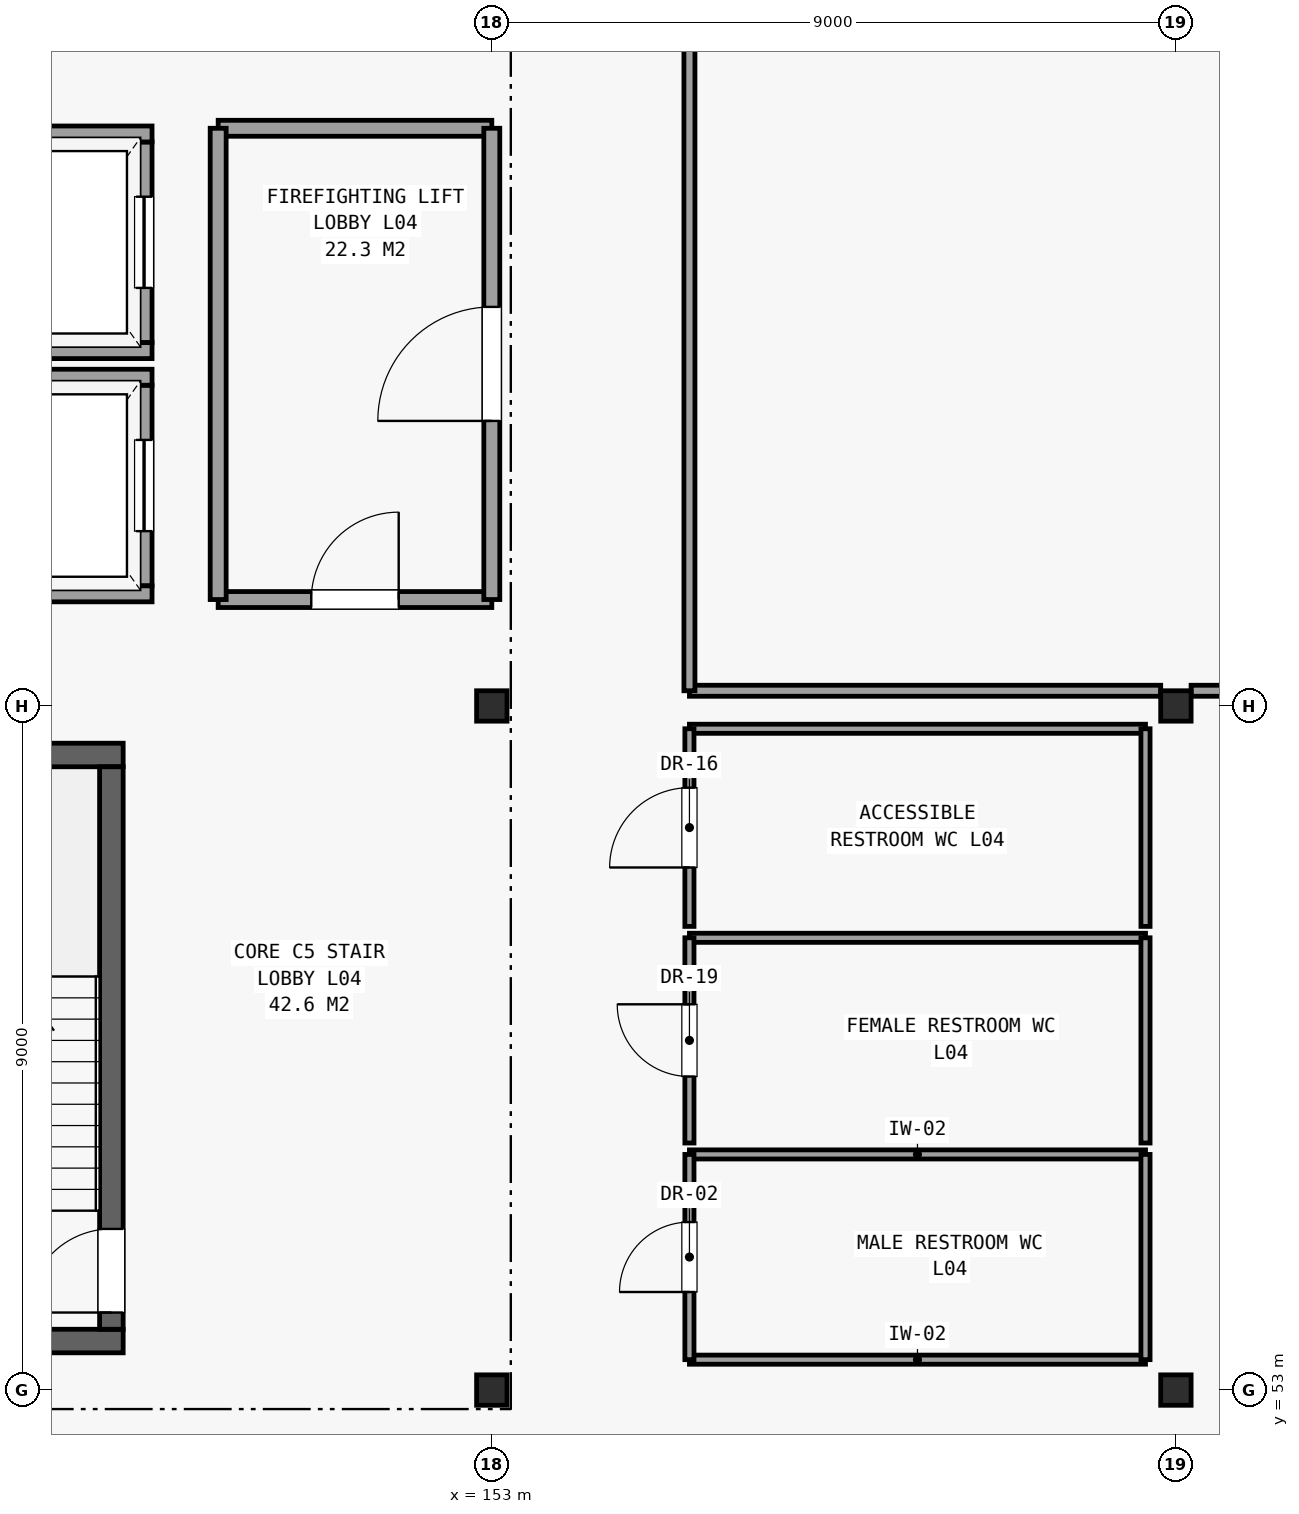
"""IFC4 building model, lengths in metres.
Left out: names, types, materials, properties, quantities, classifications, styles, units other than length and angle.
Written with IfcOpenShell. Run it as: python <this file> out.ifc"""

import sys

from ifc_helpers import new_model, si_unit, direction, frame, frame_2d, origin, origin_2d, place, context, subcontext, project, spatial, rectangle, hollow_rectangle, extrude, element, fill, save


model = new_model("IFC4")
c1 = context("Model", 3, precision=1e-05, world=origin(), true_north=direction((0.0, 1.0)))
c2 = subcontext(c1, "Body", "Model", "MODEL_VIEW")
j1 = project(units=[si_unit("LENGTHUNIT", "METRE"), si_unit("PLANEANGLEUNIT", "RADIAN")], contexts=[c1])
p1 = place(None, origin())
s1 = spatial("IfcSite", under=j1, at=p1, CompositionType="ELEMENT")
p2 = place(p1, origin())
s2 = spatial("IfcBuilding", under=s1, at=p2, CompositionType="ELEMENT")
p3 = place(p2, frame((0.0, 0.0, 17.7)))
s3 = spatial("IfcBuildingStorey", under=s2, at=p3, CompositionType="ELEMENT", Elevation=17.7)
for number, where, z_axis, x_axis in (
    (1, (153.0, 53.0, 0.0), (0.0, 0.0, 1.0), (1.0, 0.0, 0.0)),
    (2, (153.0, 62.0, 0.0), (0.0, 0.0, 1.0), (1.0, 0.0, 0.0)),
    (3, (162.0, 53.0, 0.0), (0.0, 0.0, 1.0), (1.0, 0.0, 0.0)),
    (4, (162.0, 62.0, 0.0), (0.0, 0.0, 1.0), (1.0, 0.0, 0.0)),
):
    element("IfcColumn", number, at=place(p3, frame(where, z_axis=z_axis, x_axis=x_axis)), inside=s3, PredefinedType="COLUMN", context=c2, shape_type="SweptSolid", body=[
        extrude(hollow_rectangle(XDim=0.4, YDim=0.4, WallThickness=0.019, at=origin_2d()), origin(), (0.0, 0.0, 1.0), 4.2),
    ])
for number, where, z_axis, x_axis in (
    (5, (144.25, 53.645, 0.0), (0.0, 0.0, 1.0), (1.0, 0.0, 0.0)),
    (6, (144.25, 61.355, 0.0), (0.0, 0.0, 1.0), (1.0, 0.0, 0.0)),
):
    element("IfcWall", number, at=place(p3, frame(where, z_axis=z_axis, x_axis=x_axis)), inside=s3, PredefinedType="SHEAR", context=c2, shape_type="SweptSolid", body=[
        extrude(rectangle(XDim=3.9, YDim=0.31, at=frame_2d((1.95, 0.0))), origin(), (0.0, 0.0, 1.0), 3.94),
    ])
p4 = place(p3, frame((147.995, 53.8, 0.0), z_axis=(0.0, 0.0, 1.0), x_axis=(0.0, 1.0, 0.0)))
e7 = element("IfcWall", 7, at=p4, inside=s3, PredefinedType="SHEAR", context=c2, shape_type="SweptSolid", body=[
    extrude(rectangle(XDim=7.4, YDim=0.31, at=frame_2d((3.7, 0.0))), origin(), (0.0, 0.0, 1.0), 3.94),
])
p5 = place(p4, frame((0.22, 0.0, 0.0)))
e8 = element("IfcOpeningElement", 8, at=p5, cuts=e7, PredefinedType="OPENING", context=c2, shape_type="SweptSolid", body=[
    extrude(rectangle(XDim=1.1, YDim=2.15, at=frame_2d((0.55, 1.075))), frame((0.0, 0.166, 0.0), z_axis=(0.0, -1.0, 0.0), x_axis=(1.0, 0.0, 0.0)), (0.0, 0.0, 1.0), 0.332),
])
p6 = place(p3, frame((148.425, 63.58, 0.0), z_axis=(0.0, 0.0, 1.0), x_axis=(0.0, 1.0, 0.0)))
e9 = element("IfcWall", 9, at=p6, inside=s3, PredefinedType="PARTITIONING", context=c2, shape_type="SweptSolid", body=[
    extrude(rectangle(XDim=2.64, YDim=0.21, at=frame_2d((1.32, 0.0))), origin(), (0.0, 0.0, 1.0), 3.94),
])
p7 = place(p6, frame((0.72, 0.0, 0.0)))
e10 = element("IfcOpeningElement", 10, at=p7, cuts=e9, PredefinedType="OPENING", context=c2, shape_type="SweptSolid", body=[
    extrude(rectangle(XDim=1.2, YDim=2.2, at=frame_2d((0.6, 1.1))), frame((0.0, 0.116, 0.0), z_axis=(0.0, -1.0, 0.0), x_axis=(1.0, 0.0, 0.0)), (0.0, 0.0, 1.0), 0.232),
])
for number, where, z_axis, x_axis in (
    (11, (146.27, 63.475, 0.0), (0.0, 0.0, 1.0), (1.0, 0.0, 0.0)),
    (12, (146.27, 66.325, 0.0), (0.0, 0.0, 1.0), (1.0, 0.0, 0.0)),
):
    element("IfcWall", number, at=place(p3, frame(where, z_axis=z_axis, x_axis=x_axis)), inside=s3, PredefinedType="PARTITIONING", context=c2, shape_type="SweptSolid", body=[
        extrude(rectangle(XDim=2.26, YDim=0.21, at=frame_2d((1.13, 0.0))), origin(), (0.0, 0.0, 1.0), 3.94),
    ])
p8 = place(p3, frame((148.425, 66.78, 0.0), z_axis=(0.0, 0.0, 1.0), x_axis=(0.0, 1.0, 0.0)))
e13 = element("IfcWall", 13, at=p8, inside=s3, PredefinedType="PARTITIONING", context=c2, shape_type="SweptSolid", body=[
    extrude(rectangle(XDim=2.64, YDim=0.21, at=frame_2d((1.32, 0.0))), origin(), (0.0, 0.0, 1.0), 3.94),
])
p9 = place(p8, frame((0.72, 0.0, 0.0)))
e14 = element("IfcOpeningElement", 14, at=p9, cuts=e13, PredefinedType="OPENING", context=c2, shape_type="SweptSolid", body=[
    extrude(rectangle(XDim=1.2, YDim=2.2, at=frame_2d((0.6, 1.1))), frame((0.0, 0.116, 0.0), z_axis=(0.0, -1.0, 0.0), x_axis=(1.0, 0.0, 0.0)), (0.0, 0.0, 1.0), 0.232),
])
for number, where, z_axis, x_axis in (
    (15, (146.27, 66.675, 0.0), (0.0, 0.0, 1.0), (1.0, 0.0, 0.0)),
    (16, (146.27, 69.525, 0.0), (0.0, 0.0, 1.0), (1.0, 0.0, 0.0)),
):
    element("IfcWall", number, at=place(p3, frame(where, z_axis=z_axis, x_axis=x_axis)), inside=s3, PredefinedType="PARTITIONING", context=c2, shape_type="SweptSolid", body=[
        extrude(rectangle(XDim=2.26, YDim=0.21, at=frame_2d((1.13, 0.0))), origin(), (0.0, 0.0, 1.0), 3.94),
    ])
p10 = place(p3, frame((149.4, 63.4, 0.0), z_axis=(0.0, 0.0, 1.0), x_axis=(1.0, 0.0, 0.0)))
e17 = element("IfcWall", 17, at=p10, inside=s3, PredefinedType="PARTITIONING", context=c2, shape_type="SweptSolid", body=[
    extrude(rectangle(XDim=3.6, YDim=0.21, at=frame_2d((1.8, 0.0))), origin(), (0.0, 0.0, 1.0), 3.29),
])
p11 = place(p10, frame((1.225, 0.0, 0.0)))
e18 = element("IfcOpeningElement", 18, at=p11, cuts=e17, PredefinedType="OPENING", context=c2, shape_type="SweptSolid", body=[
    extrude(rectangle(XDim=1.15, YDim=2.2, at=frame_2d((0.575, 1.1))), frame((0.0, 0.116, 0.0), z_axis=(0.0, -1.0, 0.0), x_axis=(1.0, 0.0, 0.0)), (0.0, 0.0, 1.0), 0.232),
])
p12 = place(p3, frame((149.4, 69.6, 0.0), z_axis=(0.0, 0.0, 1.0), x_axis=(1.0, 0.0, 0.0)))
e19 = element("IfcWall", 19, at=p12, inside=s3, PredefinedType="PARTITIONING", context=c2, shape_type="SweptSolid", body=[
    extrude(rectangle(XDim=3.6, YDim=0.21, at=frame_2d((1.8, 0.0))), origin(), (0.0, 0.0, 1.0), 3.29),
])
p13 = place(p3, frame((149.4, 63.4, 0.0), z_axis=(0.0, 0.0, 1.0), x_axis=(0.0, 1.0, 0.0)))
e20 = element("IfcWall", 20, at=p13, inside=s3, PredefinedType="PARTITIONING", context=c2, shape_type="SweptSolid", body=[
    extrude(rectangle(XDim=6.2, YDim=0.21, at=frame_2d((3.1, 0.0))), origin(), (0.0, 0.0, 1.0), 3.94),
])
p14 = place(p3, frame((153.0, 63.4, 0.0), z_axis=(0.0, 0.0, 1.0), x_axis=(0.0, 1.0, 0.0)))
e21 = element("IfcWall", 21, at=p14, inside=s3, PredefinedType="PARTITIONING", context=c2, shape_type="SweptSolid", body=[
    extrude(rectangle(XDim=6.2, YDim=0.21, at=frame_2d((3.1, 0.0))), origin(), (0.0, 0.0, 1.0), 3.29),
])
p15 = place(p14, frame((2.35, 0.0, 0.0)))
e22 = element("IfcOpeningElement", 22, at=p15, cuts=e21, PredefinedType="OPENING", context=c2, shape_type="SweptSolid", body=[
    extrude(rectangle(XDim=1.5, YDim=2.25, at=frame_2d((0.75, 1.125))), frame((0.0, 0.116, 0.0), z_axis=(0.0, -1.0, 0.0), x_axis=(1.0, 0.0, 0.0)), (0.0, 0.0, 1.0), 0.232),
])
for number, where, z_axis, x_axis in (
    (23, (155.6, 53.4, 0.0), (0.0, 0.0, 1.0), (1.0, 0.0, 0.0)),
    (24, (155.6, 56.1, 0.0), (0.0, 0.0, 1.0), (1.0, 0.0, 0.0)),
):
    element("IfcWall", number, at=place(p3, frame(where, z_axis=z_axis, x_axis=x_axis)), inside=s3, PredefinedType="PARTITIONING", context=c2, shape_type="SweptSolid", body=[
        extrude(rectangle(XDim=6.0, YDim=0.12, at=frame_2d((3.0, 0.0))), origin(), (0.0, 0.0, 1.0), 3.94),
    ])
p16 = place(p3, frame((155.6, 53.4, 0.0), z_axis=(0.0, 0.0, 1.0), x_axis=(0.0, 1.0, 0.0)))
e25 = element("IfcWall", 25, at=p16, inside=s3, PredefinedType="PARTITIONING", context=c2, shape_type="SweptSolid", body=[
    extrude(rectangle(XDim=2.7, YDim=0.12, at=frame_2d((1.35, 0.0))), origin(), (0.0, 0.0, 1.0), 3.94),
])
p17 = place(p16, frame((0.89, 0.0, 0.0)))
e26 = element("IfcOpeningElement", 26, at=p17, cuts=e25, PredefinedType="OPENING", context=c2, shape_type="SweptSolid", body=[
    extrude(rectangle(XDim=0.92, YDim=2.1, at=frame_2d((0.46, 1.05))), frame((0.0, 0.071, 0.0), z_axis=(0.0, -1.0, 0.0), x_axis=(1.0, 0.0, 0.0)), (0.0, 0.0, 1.0), 0.142),
])
p18 = place(p3, frame((161.6, 53.4, 0.0), z_axis=(0.0, 0.0, 1.0), x_axis=(0.0, 1.0, 0.0)))
e27 = element("IfcWall", 27, at=p18, inside=s3, PredefinedType="PARTITIONING", context=c2, shape_type="SweptSolid", body=[
    extrude(rectangle(XDim=2.7, YDim=0.12, at=frame_2d((1.35, 0.0))), origin(), (0.0, 0.0, 1.0), 3.94),
])
p19 = place(p3, frame((155.6, 58.95, 0.0), z_axis=(0.0, 0.0, 1.0), x_axis=(1.0, 0.0, 0.0)))
e28 = element("IfcWall", 28, at=p19, inside=s3, PredefinedType="PARTITIONING", context=c2, shape_type="SweptSolid", body=[
    extrude(rectangle(XDim=6.0, YDim=0.12, at=frame_2d((3.0, 0.0))), origin(), (0.0, 0.0, 1.0), 3.94),
])
p20 = place(p3, frame((155.6, 56.25, 0.0), z_axis=(0.0, 0.0, 1.0), x_axis=(0.0, 1.0, 0.0)))
e29 = element("IfcWall", 29, at=p20, inside=s3, PredefinedType="PARTITIONING", context=c2, shape_type="SweptSolid", body=[
    extrude(rectangle(XDim=2.7, YDim=0.12, at=frame_2d((1.35, 0.0))), origin(), (0.0, 0.0, 1.0), 3.44),
])
p21 = place(p20, frame((0.875, 0.0, 0.0)))
e30 = element("IfcOpeningElement", 30, at=p21, cuts=e29, PredefinedType="OPENING", context=c2, shape_type="SweptSolid", body=[
    extrude(rectangle(XDim=0.95, YDim=2.15, at=frame_2d((0.475, 1.075))), frame((0.0, 0.071, 0.0), z_axis=(0.0, -1.0, 0.0), x_axis=(1.0, 0.0, 0.0)), (0.0, 0.0, 1.0), 0.142),
])
p22 = place(p3, frame((161.6, 56.25, 0.0), z_axis=(0.0, 0.0, 1.0), x_axis=(0.0, 1.0, 0.0)))
e31 = element("IfcWall", 31, at=p22, inside=s3, PredefinedType="PARTITIONING", context=c2, shape_type="SweptSolid", body=[
    extrude(rectangle(XDim=2.7, YDim=0.12, at=frame_2d((1.35, 0.0))), origin(), (0.0, 0.0, 1.0), 3.44),
])
p23 = place(p3, frame((155.6, 61.7, 0.0), z_axis=(0.0, 0.0, 1.0), x_axis=(1.0, 0.0, 0.0)))
e32 = element("IfcWall", 32, at=p23, inside=s3, PredefinedType="PARTITIONING", context=c2, shape_type="SweptSolid", body=[
    extrude(rectangle(XDim=6.0, YDim=0.12, at=frame_2d((3.0, 0.0))), origin(), (0.0, 0.0, 1.0), 3.24),
])
p24 = place(p3, frame((155.6, 59.1, 0.0), z_axis=(0.0, 0.0, 1.0), x_axis=(0.0, 1.0, 0.0)))
e33 = element("IfcWall", 33, at=p24, inside=s3, PredefinedType="PARTITIONING", context=c2, shape_type="SweptSolid", body=[
    extrude(rectangle(XDim=2.6, YDim=0.12, at=frame_2d((1.3, 0.0))), origin(), (0.0, 0.0, 1.0), 3.24),
])
p25 = place(p24, frame((0.775, 0.0, 0.0)))
e34 = element("IfcOpeningElement", 34, at=p25, cuts=e33, PredefinedType="OPENING", context=c2, shape_type="SweptSolid", body=[
    extrude(rectangle(XDim=1.05, YDim=2.2, at=frame_2d((0.525, 1.1))), frame((0.0, 0.071, 0.0), z_axis=(0.0, -1.0, 0.0), x_axis=(1.0, 0.0, 0.0)), (0.0, 0.0, 1.0), 0.142),
])
p26 = place(p3, frame((161.6, 59.1, 0.0), z_axis=(0.0, 0.0, 1.0), x_axis=(0.0, 1.0, 0.0)))
e35 = element("IfcWall", 35, at=p26, inside=s3, PredefinedType="PARTITIONING", context=c2, shape_type="SweptSolid", body=[
    extrude(rectangle(XDim=2.6, YDim=0.12, at=frame_2d((1.3, 0.0))), origin(), (0.0, 0.0, 1.0), 3.24),
])
p27 = place(p3, frame((155.6, 62.2, 0.0), z_axis=(0.0, 0.0, 1.0), x_axis=(1.0, 0.0, 0.0)))
e36 = element("IfcWall", 36, at=p27, inside=s3, PredefinedType="PARTITIONING", context=c2, shape_type="SweptSolid", body=[
    extrude(rectangle(XDim=6.2, YDim=0.145, at=frame_2d((3.1, 0.0))), origin(), (0.0, 0.0, 1.0), 3.24),
])
p28 = place(p3, frame((162.2, 62.2, 0.0), z_axis=(0.0, 0.0, 1.0), x_axis=(1.0, 0.0, 0.0)))
e37 = element("IfcWall", 37, at=p28, inside=s3, PredefinedType="PARTITIONING", context=c2, shape_type="SweptSolid", body=[
    extrude(rectangle(XDim=8.6, YDim=0.145, at=frame_2d((4.3, 0.0))), origin(), (0.0, 0.0, 1.0), 3.24),
])
p29 = place(p3, frame((155.6, 62.2, 0.0), z_axis=(0.0, 0.0, 1.0), x_axis=(0.0, 1.0, 0.0)))
e38 = element("IfcWall", 38, at=p29, inside=s3, PredefinedType="PARTITIONING", context=c2, shape_type="SweptSolid", body=[
    extrude(rectangle(XDim=17.6, YDim=0.145, at=frame_2d((8.8, 0.0))), origin(), (0.0, 0.0, 1.0), 3.24),
])
p30 = place(p29, frame((12.18, 0.0, 0.0)))
e39 = element("IfcOpeningElement", 39, at=p30, cuts=e38, PredefinedType="OPENING", context=c2, shape_type="SweptSolid", body=[
    extrude(rectangle(XDim=2.24, YDim=2.733, at=frame_2d((1.12, 1.366))), frame((0.0, 0.083, 0.0), z_axis=(0.0, -1.0, 0.0), x_axis=(1.0, 0.0, 0.0)), (0.0, 0.0, 1.0), 0.167),
])
p31 = place(p5, origin())
e40 = element("IfcDoor", 40, at=p31, inside=s3, OperationType="SINGLE_SWING_LEFT", PredefinedType="DOOR", context=c2, shape_type="SweptSolid", body=[
    extrude(rectangle(XDim=1.1, YDim=2.15, at=frame_2d((0.55, 1.075))), frame((0.0, 0.025, 0.0), z_axis=(0.0, -1.0, 0.0), x_axis=(1.0, 0.0, 0.0)), (0.0, 0.0, 1.0), 0.05),
])
fill(e8, e40)
p32 = place(p7, origin())
e41 = element("IfcDoor", 41, at=p32, inside=s3, OperationType="SLIDING_TO_LEFT", PredefinedType="DOOR", context=c2, shape_type="SweptSolid", body=[
    extrude(rectangle(XDim=1.2, YDim=2.2, at=frame_2d((0.6, 1.1))), frame((0.0, 0.025, 0.0), z_axis=(0.0, -1.0, 0.0), x_axis=(1.0, 0.0, 0.0)), (0.0, 0.0, 1.0), 0.05),
])
fill(e10, e41)
p33 = place(p9, origin())
e42 = element("IfcDoor", 42, at=p33, inside=s3, OperationType="SLIDING_TO_RIGHT", PredefinedType="DOOR", context=c2, shape_type="SweptSolid", body=[
    extrude(rectangle(XDim=1.2, YDim=2.2, at=frame_2d((0.6, 1.1))), frame((0.0, 0.025, 0.0), z_axis=(0.0, -1.0, 0.0), x_axis=(1.0, 0.0, 0.0)), (0.0, 0.0, 1.0), 0.05),
])
fill(e14, e42)
p34 = place(p11, origin())
e43 = element("IfcDoor", 43, at=p34, inside=s3, OperationType="SINGLE_SWING_RIGHT", PredefinedType="DOOR", context=c2, shape_type="SweptSolid", body=[
    extrude(rectangle(XDim=1.15, YDim=2.2, at=frame_2d((0.575, 1.1))), frame((0.0, 0.025, 0.0), z_axis=(0.0, -1.0, 0.0), x_axis=(1.0, 0.0, 0.0)), (0.0, 0.0, 1.0), 0.05),
])
fill(e18, e43)
p35 = place(p15, origin())
e44 = element("IfcDoor", 44, at=p35, inside=s3, OperationType="SINGLE_SWING_LEFT", PredefinedType="DOOR", context=c2, shape_type="SweptSolid", body=[
    extrude(rectangle(XDim=1.5, YDim=2.25, at=frame_2d((0.75, 1.125))), frame((0.0, 0.025, 0.0), z_axis=(0.0, -1.0, 0.0), x_axis=(1.0, 0.0, 0.0)), (0.0, 0.0, 1.0), 0.05),
])
fill(e22, e44)
p36 = place(p17, origin())
e45 = element("IfcDoor", 45, at=p36, inside=s3, OperationType="SINGLE_SWING_LEFT", PredefinedType="DOOR", context=c2, shape_type="SweptSolid", body=[
    extrude(rectangle(XDim=0.92, YDim=2.1, at=frame_2d((0.46, 1.05))), frame((0.0, 0.025, 0.0), z_axis=(0.0, -1.0, 0.0), x_axis=(1.0, 0.0, 0.0)), (0.0, 0.0, 1.0), 0.05),
])
fill(e26, e45)
p37 = place(p21, origin())
e46 = element("IfcDoor", 46, at=p37, inside=s3, OperationType="SINGLE_SWING_RIGHT", PredefinedType="DOOR", context=c2, shape_type="SweptSolid", body=[
    extrude(rectangle(XDim=0.95, YDim=2.15, at=frame_2d((0.475, 1.075))), frame((0.0, 0.025, 0.0), z_axis=(0.0, -1.0, 0.0), x_axis=(1.0, 0.0, 0.0)), (0.0, 0.0, 1.0), 0.05),
])
fill(e30, e46)
p38 = place(p25, origin())
e47 = element("IfcDoor", 47, at=p38, inside=s3, OperationType="SINGLE_SWING_LEFT", PredefinedType="DOOR", context=c2, shape_type="SweptSolid", body=[
    extrude(rectangle(XDim=1.05, YDim=2.2, at=frame_2d((0.525, 1.1))), frame((0.0, 0.025, 0.0), z_axis=(0.0, -1.0, 0.0), x_axis=(1.0, 0.0, 0.0)), (0.0, 0.0, 1.0), 0.05),
])
fill(e34, e47)
save(model, sys.argv[1])
